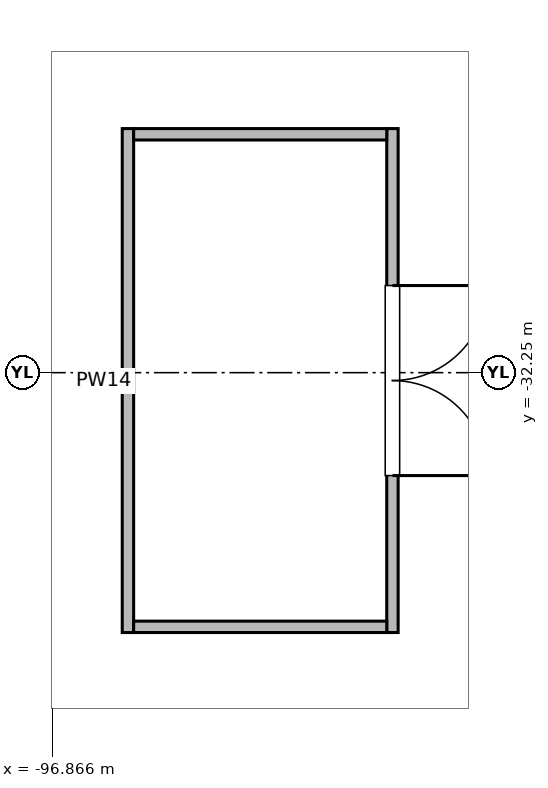
"""IFC4 building model, lengths in metres.
Left out: names, types, materials, properties, quantities, classifications, styles, units other than length and angle.
Written with IfcOpenShell. Run it as: python <this file> out.ifc"""

import sys

from ifc_helpers import new_model, si_unit, direction, frame, frame_2d, origin, place, context, subcontext, project, spatial, rectangle, extrude, element, fill, save


model = new_model("IFC4")
c1 = context("Model", 3, precision=1e-05, world=origin(), true_north=direction((0.0, 1.0)))
c2 = subcontext(c1, "Body", "Model", "MODEL_VIEW")
j1 = project(units=[si_unit("LENGTHUNIT", "METRE"), si_unit("PLANEANGLEUNIT", "RADIAN")], contexts=[c1])
p1 = place(None, origin())
s1 = spatial("IfcSite", under=j1, at=p1, CompositionType="ELEMENT")
p2 = place(p1, origin())
s2 = spatial("IfcBuilding", under=s1, at=p2, CompositionType="ELEMENT")
p3 = place(p2, frame((0.0, 0.0, -6.0)))
s3 = spatial("IfcBuildingStorey", under=s2, at=p3, CompositionType="ELEMENT", Elevation=-6.0)
p4 = place(p3, frame((-92.387, -29.039, 0.0), z_axis=(0.0, 0.0, 1.0), x_axis=(0.0, -1.0, 0.0)))
e1 = element("IfcWall", 1, at=p4, inside=s3, PredefinedType="PARTITIONING", context=c2, shape_type="SweptSolid", body=[
    extrude(rectangle(XDim=6.63, YDim=0.15, at=frame_2d((3.315, 0.0))), origin(), (0.0, 0.0, 1.0), 5.02),
])
p5 = place(p4, frame((2.065, 0.0, 0.0)))
e2 = element("IfcOpeningElement", 2, at=p5, cuts=e1, PredefinedType="OPENING", context=c2, shape_type="SweptSolid", body=[
    extrude(rectangle(XDim=2.5, YDim=2.5, at=frame_2d((1.25, 1.25))), frame((0.0, 0.085, 0.0), z_axis=(0.0, -1.0, 0.0), x_axis=(1.0, 0.0, 0.0)), (0.0, 0.0, 1.0), 0.17),
])
p6 = place(p3, frame((-95.867, -35.669, 0.0), z_axis=(0.0, 0.0, 1.0), x_axis=(0.0, 1.0, 0.0)))
e3 = element("IfcWall", 3, at=p6, inside=s3, PredefinedType="PARTITIONING", context=c2, shape_type="SweptSolid", body=[
    extrude(rectangle(XDim=6.63, YDim=0.15, at=frame_2d((3.315, 0.0))), origin(), (0.0, 0.0, 1.0), 5.02),
])
for number, where, z_axis, x_axis in (
    (4, (-95.792, -35.594, 0.0), (0.0, 0.0, 1.0), (1.0, 0.0, 0.0)),
    (5, (-95.792, -29.114, 0.0), (0.0, 0.0, 1.0), (1.0, 0.0, 0.0)),
):
    element("IfcWall", number, at=place(p3, frame(where, z_axis=z_axis, x_axis=x_axis)), inside=s3, PredefinedType="PARTITIONING", context=c2, shape_type="SweptSolid", body=[
        extrude(rectangle(XDim=3.33, YDim=0.15, at=frame_2d((1.665, 0.0))), origin(), (0.0, 0.0, 1.0), 5.02),
    ])
p7 = place(p5, origin())
e6 = element("IfcDoor", 6, at=p7, inside=s3, OperationType="DOUBLE_DOOR_SINGLE_SWING", PredefinedType="DOOR", context=c2, shape_type="SweptSolid", body=[
    extrude(rectangle(XDim=2.5, YDim=2.5, at=frame_2d((1.25, 1.25))), frame((0.0, 0.025, 0.0), z_axis=(0.0, -1.0, 0.0), x_axis=(1.0, 0.0, 0.0)), (0.0, 0.0, 1.0), 0.05),
])
fill(e2, e6)
save(model, sys.argv[1])
